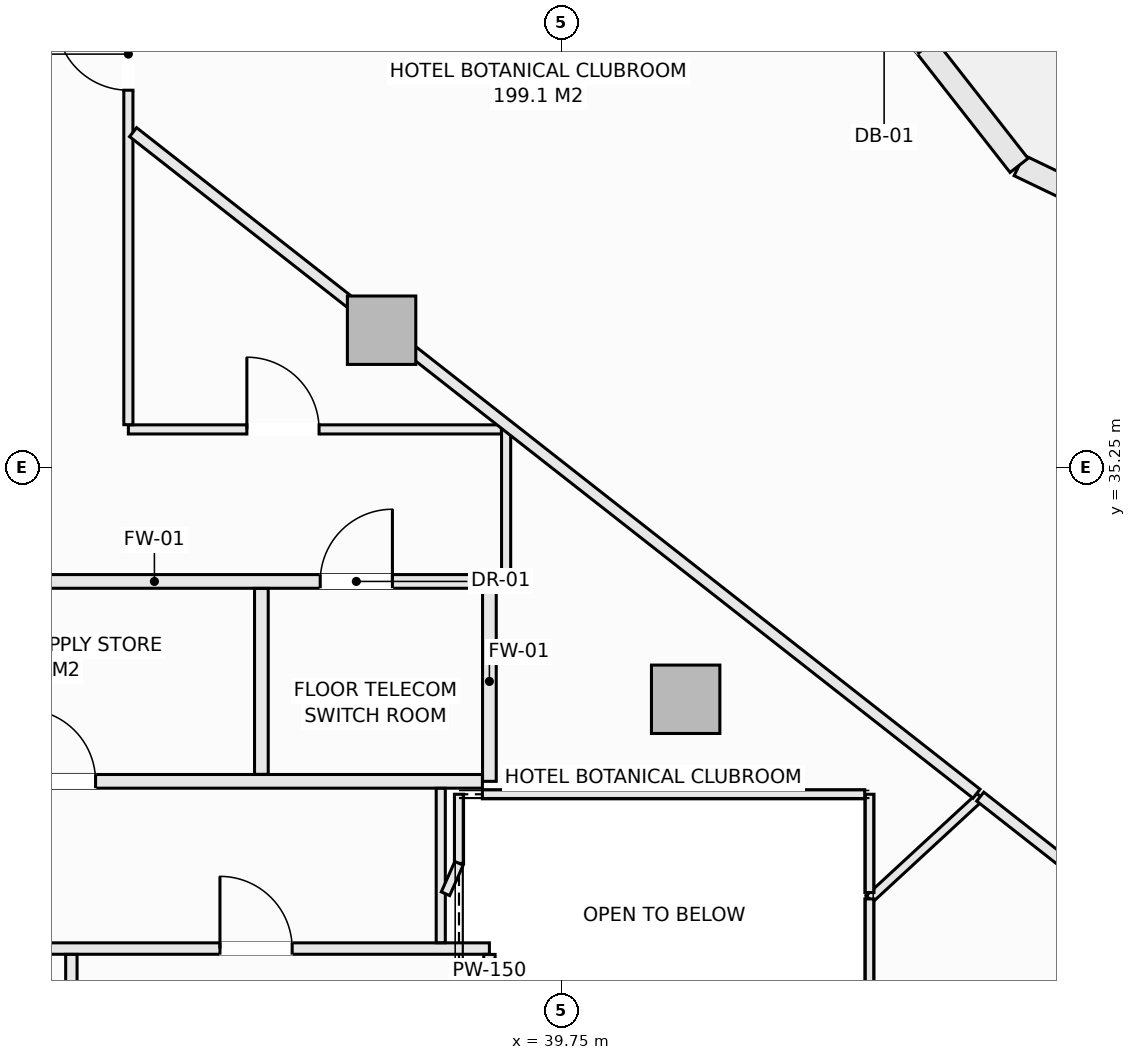
"""IFC4 building model, lengths in metres.
Left out: names, types, materials, properties, quantities, classifications, styles, units other than length and angle.
Written with IfcOpenShell. Run it as: python <this file> out.ifc"""

import sys

from ifc_helpers import new_model, si_unit, direction, frame, frame_2d, origin, origin_2d, place, context, subcontext, project, spatial, rectangle, extrude, element, fill, save


model = new_model("IFC4")
c1 = context("Model", 3, precision=1e-05, world=origin(), true_north=direction((0.0, 1.0)))
c2 = subcontext(c1, "Body", "Model", "MODEL_VIEW")
j1 = project(units=[si_unit("LENGTHUNIT", "METRE"), si_unit("PLANEANGLEUNIT", "RADIAN")], contexts=[c1])
p1 = place(None, origin())
s1 = spatial("IfcSite", under=j1, at=p1, CompositionType="ELEMENT")
p2 = place(p1, origin())
s2 = spatial("IfcBuilding", under=s1, at=p2, CompositionType="ELEMENT")
p3 = place(p2, frame((0.0, 0.0, 112.1)))
s3 = spatial("IfcBuildingStorey", under=s2, at=p3, CompositionType="ELEMENT", Elevation=112.1)
for number, where, z_axis, x_axis in (
    (1, (41.382, 32.199, -0.27), (0.0, 0.0, 1.0), (1.0, 0.0, 0.0)),
    (2, (37.382, 37.055, -0.27), (0.0, 0.0, 1.0), (1.0, 0.0, 0.0)),
):
    element("IfcColumn", number, at=place(p3, frame(where, z_axis=z_axis, x_axis=x_axis)), inside=s3, PredefinedType="COLUMN", context=c2, shape_type="SweptSolid", body=[
        extrude(rectangle(XDim=0.9, YDim=0.9, at=origin_2d()), origin(), (0.0, 0.0, 1.0), 3.4),
    ])
p4 = place(p3, frame((45.769, 39.223, 0.0), z_axis=(0.0, 0.0, 1.0), x_axis=(0.901370184739, -0.433049408339, 0.0)))
e3 = element("IfcWall", 3, at=p4, inside=s3, PredefinedType="SOLIDWALL", context=c2, shape_type="SweptSolid", body=[
    extrude(rectangle(XDim=5.884, YDim=0.3, at=frame_2d((2.942, 0.0))), origin(), (0.0, 0.0, 1.0), 2.653),
])
p5 = place(p4, frame((1.892, 0.0, 0.74)))
e4 = element("IfcOpeningElement", 4, at=p5, cuts=e3, PredefinedType="OPENING", context=c2, shape_type="SweptSolid", body=[
    extrude(rectangle(XDim=2.1, YDim=1.7, at=frame_2d((1.05, 0.85))), frame((0.0, 0.16, 0.0), z_axis=(0.0, -1.0, 0.0), x_axis=(1.0, 0.0, 0.0)), (0.0, 0.0, 1.0), 0.32),
])
p6 = place(p3, frame((42.219, 43.758, 0.0), z_axis=(0.0, 0.0, 1.0), x_axis=(0.616435134162, -0.787405693001, 0.0)))
e5 = element("IfcWall", 5, at=p6, inside=s3, PredefinedType="SOLIDWALL", context=c2, shape_type="SweptSolid", body=[
    extrude(rectangle(XDim=5.759, YDim=0.3, at=frame_2d((2.879, 0.0))), origin(), (0.0, 0.0, 1.0), 2.653),
])
p7 = place(p6, frame((1.979, 0.0, 0.0)))
e6 = element("IfcOpeningElement", 6, at=p7, cuts=e5, PredefinedType="OPENING", context=c2, shape_type="SweptSolid", body=[
    extrude(rectangle(XDim=1.8, YDim=2.25, at=frame_2d((0.9, 1.125))), frame((0.0, 0.16, 0.0), z_axis=(0.0, -1.0, 0.0), x_axis=(1.0, 0.0, 0.0)), (0.0, 0.0, 1.0), 0.32),
])
p8 = place(p3, frame((30.077, 28.92, 0.0), z_axis=(0.0, 0.0, 1.0), x_axis=(1.0, 0.0, 0.0)))
e7 = element("IfcWall", 7, at=p8, inside=s3, PredefinedType="PARTITIONING", context=c2, shape_type="SweptSolid", body=[
    extrude(rectangle(XDim=8.723, YDim=0.15, at=frame_2d((4.362, 0.0))), origin(), (0.0, 0.0, 1.0), 3.13),
])
p9 = place(p8, frame((1.342, 0.0, 0.0)))
e8 = element("IfcOpeningElement", 8, at=p9, cuts=e7, PredefinedType="OPENING", context=c2, shape_type="SweptSolid", body=[
    extrude(rectangle(XDim=0.95, YDim=2.1, at=frame_2d((0.475, 1.05))), frame((0.0, 0.085, 0.0), z_axis=(0.0, -1.0, 0.0), x_axis=(1.0, 0.0, 0.0)), (0.0, 0.0, 1.0), 0.17),
])
p10 = place(p8, frame((5.178, 0.0, 0.0)))
e9 = element("IfcOpeningElement", 9, at=p10, cuts=e7, PredefinedType="OPENING", context=c2, shape_type="SweptSolid", body=[
    extrude(rectangle(XDim=0.95, YDim=2.1, at=frame_2d((0.475, 1.05))), frame((0.0, 0.085, 0.0), z_axis=(0.0, -1.0, 0.0), x_axis=(1.0, 0.0, 0.0)), (0.0, 0.0, 1.0), 0.17),
])
p11 = place(p3, frame((33.3, 26.877, 0.0), z_axis=(0.0, 0.0, 1.0), x_axis=(0.0, 1.0, 0.0)))
e10 = element("IfcWall", 10, at=p11, inside=s3, PredefinedType="PARTITIONING", context=c2, shape_type="SweptSolid", body=[
    extrude(rectangle(XDim=1.966, YDim=0.15, at=frame_2d((0.983, 0.0))), origin(), (0.0, 0.0, 1.0), 3.13),
])
p12 = place(p3, frame((38.8, 27.297, 0.0), z_axis=(0.0, 0.0, 1.0), x_axis=(0.0, 1.0, 0.0)))
e11 = element("IfcWall", 11, at=p12, inside=s3, PredefinedType="PARTITIONING", context=c2, shape_type="SweptSolid", body=[
    extrude(rectangle(XDim=1.546, YDim=0.15, at=frame_2d((0.773, 0.0))), origin(), (0.0, 0.0, 1.0), 3.13),
])
p13 = place(p3, frame((38.8, 31.12, 0.0), z_axis=(0.0, 0.0, 1.0), x_axis=(0.0, 1.0, 0.0)))
e12 = element("IfcWall", 12, at=p13, inside=s3, PredefinedType="SOLIDWALL", context=c2, shape_type="SweptSolid", body=[
    extrude(rectangle(XDim=2.63, YDim=0.18, at=frame_2d((1.315, 0.0))), origin(), (0.0, 0.0, 1.0), 3.13),
])
p14 = place(p3, frame((30.077, 31.12, 0.0), z_axis=(0.0, 0.0, 1.0), x_axis=(1.0, 0.0, 0.0)))
e13 = element("IfcWall", 13, at=p14, inside=s3, PredefinedType="SOLIDWALL", context=c2, shape_type="SweptSolid", body=[
    extrude(rectangle(XDim=8.631, YDim=0.18, at=frame_2d((4.315, 0.0))), origin(), (0.0, 0.0, 1.0), 3.13),
])
p15 = place(p14, frame((2.592, 0.0, 0.0)))
e14 = element("IfcOpeningElement", 14, at=p15, cuts=e13, PredefinedType="OPENING", context=c2, shape_type="SweptSolid", body=[
    extrude(rectangle(XDim=0.95, YDim=2.1, at=frame_2d((0.475, 1.05))), frame((0.0, 0.1, 0.0), z_axis=(0.0, -1.0, 0.0), x_axis=(1.0, 0.0, 0.0)), (0.0, 0.0, 1.0), 0.2),
])
p16 = place(p3, frame((30.077, 33.75, 0.0), z_axis=(0.0, 0.0, 1.0), x_axis=(1.0, 0.0, 0.0)))
e15 = element("IfcWall", 15, at=p16, inside=s3, PredefinedType="SOLIDWALL", context=c2, shape_type="SweptSolid", body=[
    extrude(rectangle(XDim=8.631, YDim=0.18, at=frame_2d((4.315, 0.0))), origin(), (0.0, 0.0, 1.0), 3.13),
])
p17 = place(p16, frame((6.497, 0.0, 0.0)))
e16 = element("IfcOpeningElement", 16, at=p17, cuts=e15, PredefinedType="OPENING", context=c2, shape_type="SweptSolid", body=[
    extrude(rectangle(XDim=0.95, YDim=2.1, at=frame_2d((0.475, 1.05))), frame((0.0, 0.1, 0.0), z_axis=(0.0, -1.0, 0.0), x_axis=(1.0, 0.0, 0.0)), (0.0, 0.0, 1.0), 0.2),
])
p18 = place(p3, frame((35.8, 31.212, 0.0), z_axis=(0.0, 0.0, 1.0), x_axis=(0.0, 1.0, 0.0)))
e17 = element("IfcWall", 17, at=p18, inside=s3, PredefinedType="SOLIDWALL", context=c2, shape_type="SweptSolid", body=[
    extrude(rectangle(XDim=2.446, YDim=0.18, at=frame_2d((1.223, 0.0))), origin(), (0.0, 0.0, 1.0), 3.13),
])
p19 = place(p3, frame((39.02, 33.75, 0.0), z_axis=(0.0, 0.0, 1.0), x_axis=(0.0, 1.0, 0.0)))
e18 = element("IfcWall", 18, at=p19, inside=s3, PredefinedType="PARTITIONING", context=c2, shape_type="SweptSolid", body=[
    extrude(rectangle(XDim=2.0, YDim=0.12, at=frame_2d((1.0, 0.0))), origin(), (0.0, 0.0, 1.0), 3.13),
])
p20 = place(p3, frame((34.05, 35.75, 0.0), z_axis=(0.0, 0.0, 1.0), x_axis=(1.0, 0.0, 0.0)))
e19 = element("IfcWall", 19, at=p20, inside=s3, PredefinedType="PARTITIONING", context=c2, shape_type="SweptSolid", body=[
    extrude(rectangle(XDim=4.908, YDim=0.12, at=frame_2d((2.454, 0.0))), origin(), (0.0, 0.0, 1.0), 2.505),
])
p21 = place(p20, frame((1.559, 0.0, 0.0)))
e20 = element("IfcOpeningElement", 20, at=p21, cuts=e19, PredefinedType="OPENING", context=c2, shape_type="SweptSolid", body=[
    extrude(rectangle(XDim=0.95, YDim=2.1, at=frame_2d((0.475, 1.05))), frame((0.0, 0.07, 0.0), z_axis=(0.0, -1.0, 0.0), x_axis=(1.0, 0.0, 0.0)), (0.0, 0.0, 1.0), 0.14),
])
p22 = place(p3, frame((34.05, 35.812, 0.0), z_axis=(0.0, 0.0, 1.0), x_axis=(0.0, 1.0, 0.0)))
e21 = element("IfcWall", 21, at=p22, inside=s3, PredefinedType="PARTITIONING", context=c2, shape_type="SweptSolid", body=[
    extrude(rectangle(XDim=6.326, YDim=0.12, at=frame_2d((3.163, 0.0))), origin(), (0.0, 0.0, 1.0), 2.812),
])
p23 = place(p22, frame((4.4, 0.0, 0.0)))
e22 = element("IfcOpeningElement", 22, at=p23, cuts=e21, PredefinedType="OPENING", context=c2, shape_type="SweptSolid", body=[
    extrude(rectangle(XDim=0.95, YDim=2.1, at=frame_2d((0.475, 1.05))), frame((0.0, 0.07, 0.0), z_axis=(0.0, -1.0, 0.0), x_axis=(1.0, 0.0, 0.0)), (0.0, 0.0, 1.0), 0.14),
])
p24 = place(p3, frame((38.16, 28.997, 0.0), z_axis=(0.0, 0.0, 1.0), x_axis=(0.0, 1.0, 0.0)))
e23 = element("IfcWall", 23, at=p24, inside=s3, PredefinedType="PARTITIONING", context=c2, shape_type="SweptSolid", body=[
    extrude(rectangle(XDim=2.031, YDim=0.12, at=frame_2d((1.016, 0.0))), origin(), (0.0, 0.0, 1.0), 3.13),
])
p25 = place(p3, frame((43.8, 29.573, 0.0), z_axis=(0.0, 0.0, 1.0), x_axis=(0.734897778704, 0.678177893222, 0.0)))
e24 = element("IfcWall", 24, at=p25, inside=s3, PredefinedType="PARTITIONING", context=c2, shape_type="SweptSolid", body=[
    extrude(rectangle(XDim=1.984, YDim=0.12, at=frame_2d((0.992, 0.0))), origin(), (0.0, 0.0, 1.0), 3.13),
])
p26 = place(p3, frame((43.8, 27.75, 0.0), z_axis=(0.0, 0.0, 1.0), x_axis=(0.0, 1.0, 0.0)))
e25 = element("IfcWall", 25, at=p26, inside=s3, PredefinedType="PARTITIONING", context=c2, shape_type="SweptSolid", body=[
    extrude(rectangle(XDim=1.823, YDim=0.12, at=frame_2d((0.912, 0.0))), origin(), (0.0, 0.0, 1.0), 3.13),
])
p27 = place(p3, frame((43.8, 29.657, 0.0), z_axis=(0.0, 0.0, 1.0), x_axis=(0.0, 1.0, 0.0)))
e26 = element("IfcWall", 26, at=p27, inside=s3, PredefinedType="PARTITIONING", context=c2, shape_type="SweptSolid", body=[
    extrude(rectangle(XDim=1.293, YDim=0.12, at=frame_2d((0.646, 0.0))), origin(), (0.0, 0.0, 1.0), 3.13),
])
p28 = place(p3, frame((34.112, 39.661, 0.0), z_axis=(0.0, 0.0, 1.0), x_axis=(0.786863471843, -0.617127115495, 0.0)))
e27 = element("IfcWall", 27, at=p28, inside=s3, PredefinedType="PARTITIONING", context=c2, shape_type="SweptSolid", body=[
    extrude(rectangle(XDim=14.103, YDim=0.15, at=frame_2d((7.052, 0.0))), origin(), (0.0, 0.0, 1.0), 2.505),
])
p29 = place(p3, frame((45.258, 30.919, 0.0), z_axis=(0.0, 0.0, 1.0), x_axis=(0.786869212034, -0.617119796436, 0.0)))
e28 = element("IfcWall", 28, at=p29, inside=s3, PredefinedType="PARTITIONING", context=c2, shape_type="SweptSolid", body=[
    extrude(rectangle(XDim=10.744, YDim=0.15, at=frame_2d((5.372, 0.0))), origin(), (0.0, 0.0, 1.0), 2.505),
])
p30 = place(p3, frame((38.708, 30.95, 0.0), z_axis=(0.0, 0.0, 1.0), x_axis=(1.0, 0.0, 0.0)))
e29 = element("IfcWall", 29, at=p30, inside=s3, PredefinedType="PARTITIONING", context=c2, shape_type="SweptSolid", body=[
    extrude(rectangle(XDim=5.03, YDim=0.12, at=frame_2d((2.515, 0.0))), origin(), (0.0, 0.0, 1.0), 3.13),
])
p31 = place(p3, frame((38.4, 30.041, 0.0), z_axis=(0.0, 0.0, 1.0), x_axis=(0.0, 1.0, 0.0)))
e30 = element("IfcWall", 30, at=p31, inside=s3, PredefinedType="PARTITIONING", context=c2, shape_type="SweptSolid", body=[
    extrude(rectangle(XDim=0.909, YDim=0.12, at=frame_2d((0.455, 0.0))), origin(), (0.0, 0.0, 1.0), 3.13),
])
p32 = place(p3, frame((38.222, 29.641, 0.0), z_axis=(0.0, 0.0, 1.0), x_axis=(0.406604168362, 0.913604427677, 0.0)))
e31 = element("IfcWall", 31, at=p32, inside=s3, PredefinedType="PARTITIONING", context=c2, shape_type="SweptSolid", body=[
    extrude(rectangle(XDim=0.438, YDim=0.12, at=frame_2d((0.219, 0.0))), origin(), (0.0, 0.0, 1.0), 3.13),
])
p33 = place(p10, origin())
e32 = element("IfcDoor", 32, at=p33, inside=s3, OperationType="SINGLE_SWING_LEFT", PredefinedType="DOOR", context=c2, shape_type="SweptSolid", body=[
    extrude(rectangle(XDim=0.95, YDim=2.1, at=frame_2d((0.475, 1.05))), frame((0.0, 0.025, 0.0), z_axis=(0.0, -1.0, 0.0), x_axis=(1.0, 0.0, 0.0)), (0.0, 0.0, 1.0), 0.05),
])
fill(e9, e32)
p34 = place(p15, origin())
e33 = element("IfcDoor", 33, at=p34, inside=s3, OperationType="SINGLE_SWING_LEFT", PredefinedType="DOOR", context=c2, shape_type="SweptSolid", body=[
    extrude(rectangle(XDim=0.95, YDim=2.1, at=frame_2d((0.475, 1.05))), frame((0.0, 0.025, 0.0), z_axis=(0.0, -1.0, 0.0), x_axis=(1.0, 0.0, 0.0)), (0.0, 0.0, 1.0), 0.05),
])
fill(e14, e33)
p35 = place(p17, origin())
e34 = element("IfcDoor", 34, at=p35, inside=s3, OperationType="SINGLE_SWING_RIGHT", PredefinedType="DOOR", context=c2, shape_type="SweptSolid", body=[
    extrude(rectangle(XDim=0.95, YDim=2.1, at=frame_2d((0.475, 1.05))), frame((0.0, 0.025, 0.0), z_axis=(0.0, -1.0, 0.0), x_axis=(1.0, 0.0, 0.0)), (0.0, 0.0, 1.0), 0.05),
])
fill(e16, e34)
p36 = place(p21, origin())
e35 = element("IfcDoor", 35, at=p36, inside=s3, OperationType="SINGLE_SWING_LEFT", PredefinedType="DOOR", context=c2, shape_type="SweptSolid", body=[
    extrude(rectangle(XDim=0.95, YDim=2.1, at=frame_2d((0.475, 1.05))), frame((0.0, 0.025, 0.0), z_axis=(0.0, -1.0, 0.0), x_axis=(1.0, 0.0, 0.0)), (0.0, 0.0, 1.0), 0.05),
])
fill(e20, e35)
p37 = place(p23, origin())
e36 = element("IfcDoor", 36, at=p37, inside=s3, OperationType="SINGLE_SWING_RIGHT", PredefinedType="DOOR", context=c2, shape_type="SweptSolid", body=[
    extrude(rectangle(XDim=0.95, YDim=2.1, at=frame_2d((0.475, 1.05))), frame((0.0, 0.025, 0.0), z_axis=(0.0, -1.0, 0.0), x_axis=(1.0, 0.0, 0.0)), (0.0, 0.0, 1.0), 0.05),
])
fill(e22, e36)
save(model, sys.argv[1])
